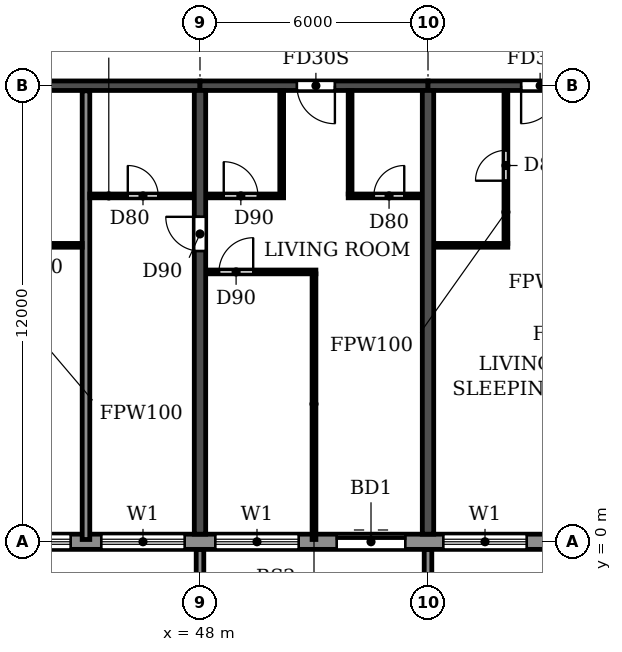
"""IFC4 building model, lengths in metres.
Left out: names, types, materials, properties, quantities, classifications, styles, units other than length and angle.
Written with IfcOpenShell. Run it as: python <this file> out.ifc"""

import sys

from ifc_helpers import new_model, si_unit, direction, frame, frame_2d, origin, place, context, subcontext, project, spatial, polyline, rectangle, outline, extrude, source, transform, mapped, element, fill, save


model = new_model("IFC4")
c1 = context("Model", 3, precision=1e-05, world=origin(), true_north=direction((0.0, 1.0)))
c2 = subcontext(c1, "Body", "Model", "MODEL_VIEW")
j1 = project(units=[si_unit("LENGTHUNIT", "METRE"), si_unit("PLANEANGLEUNIT", "RADIAN")], contexts=[c1])
p1 = place(None, origin())
s1 = spatial("IfcSite", under=j1, at=p1, CompositionType="ELEMENT")
p2 = place(p1, origin())
s2 = spatial("IfcBuilding", under=s1, at=p2, CompositionType="ELEMENT")
p3 = place(p2, frame((0.0, 0.0, 122.4)))
s3 = spatial("IfcBuildingStorey", under=s2, at=p3, CompositionType="ELEMENT", Elevation=122.4)
p4 = place(p3, frame((48.0, 0.2, 0.0), z_axis=(0.0, 0.0, 1.0), x_axis=(0.0, 1.0, 0.0)))
e1 = element("IfcWall", 1, at=p4, inside=s3, PredefinedType="SHEAR", context=c2, shape_type="SweptSolid", body=[
    extrude(rectangle(XDim=11.675, YDim=0.3, at=frame_2d((5.837, 0.0))), origin(), (0.0, 0.0, 1.0), 3.07),
])
p5 = place(p4, frame((7.45, 0.0, 0.0)))
e2 = element("IfcOpeningElement", 2, at=p5, cuts=e1, PredefinedType="OPENING", context=c2, shape_type="SweptSolid", body=[
    extrude(rectangle(XDim=0.9, YDim=2.1, at=frame_2d((0.45, 1.05))), frame((0.0, 0.16, 0.0), z_axis=(0.0, -1.0, 0.0), x_axis=(1.0, 0.0, 0.0)), (0.0, 0.0, 1.0), 0.32),
])
p6 = place(p3, frame((54.0, 0.2, 0.0), z_axis=(0.0, 0.0, 1.0), x_axis=(0.0, 1.0, 0.0)))
e3 = element("IfcWall", 3, at=p6, inside=s3, PredefinedType="SHEAR", context=c2, shape_type="SweptSolid", body=[
    extrude(rectangle(XDim=11.675, YDim=0.3, at=frame_2d((5.837, 0.0))), origin(), (0.0, 0.0, 1.0), 3.07),
])
p7 = place(p3, frame((42.0, 12.0, 0.0), z_axis=(0.0, 0.0, 1.0), x_axis=(1.0, 0.0, 0.0)))
e4 = element("IfcWall", 4, at=p7, inside=s3, PredefinedType="SHEAR", context=c2, shape_type="SweptSolid", body=[
    extrude(rectangle(XDim=6.0, YDim=0.25, at=frame_2d((3.0, 0.0))), origin(), (0.0, 0.0, 1.0), 2.47),
])
p8 = place(p3, frame((48.0, 12.0, 0.0), z_axis=(0.0, 0.0, 1.0), x_axis=(1.0, 0.0, 0.0)))
e5 = element("IfcWall", 5, at=p8, inside=s3, PredefinedType="SHEAR", context=c2, shape_type="SweptSolid", body=[
    extrude(rectangle(XDim=6.0, YDim=0.25, at=frame_2d((3.0, 0.0))), origin(), (0.0, 0.0, 1.0), 2.47),
])
p9 = place(p8, frame((2.55, 0.0, 0.0)))
e6 = element("IfcOpeningElement", 6, at=p9, cuts=e5, PredefinedType="OPENING", context=c2, shape_type="SweptSolid", body=[
    extrude(rectangle(XDim=1.0, YDim=2.1, at=frame_2d((0.5, 1.05))), frame((0.0, 0.135, 0.0), z_axis=(0.0, -1.0, 0.0), x_axis=(1.0, 0.0, 0.0)), (0.0, 0.0, 1.0), 0.27),
])
p10 = place(p3, frame((54.0, 12.0, 0.0), z_axis=(0.0, 0.0, 1.0), x_axis=(1.0, 0.0, 0.0)))
e7 = element("IfcWall", 7, at=p10, inside=s3, PredefinedType="SHEAR", context=c2, shape_type="SweptSolid", body=[
    extrude(rectangle(XDim=6.0, YDim=0.25, at=frame_2d((3.0, 0.0))), origin(), (0.0, 0.0, 1.0), 2.47),
])
p11 = place(p10, frame((2.45, 0.0, 0.0)))
e8 = element("IfcOpeningElement", 8, at=p11, cuts=e7, PredefinedType="OPENING", context=c2, shape_type="SweptSolid", body=[
    extrude(rectangle(XDim=1.0, YDim=2.1, at=frame_2d((0.5, 1.05))), frame((0.0, 0.135, 0.0), z_axis=(0.0, -1.0, 0.0), x_axis=(1.0, 0.0, 0.0)), (0.0, 0.0, 1.0), 0.27),
])
p12 = place(p3, frame((16.683, 0.0, 0.0), z_axis=(0.0, 0.0, 1.0), x_axis=(1.0, 0.0, 0.0)))
e9 = element("IfcWall", 9, at=p12, inside=s3, PredefinedType="STANDARD", context=c2, shape_type="SweptSolid", body=[
    extrude(rectangle(XDim=68.634, YDim=0.4, at=frame_2d((34.317, 0.0))), origin(), (0.0, 0.0, 1.0), 3.07),
])
p13 = place(p12, frame((1.717, 0.0, 0.9)))
e10 = element("IfcOpeningElement", 10, at=p13, cuts=e9, PredefinedType="OPENING", context=c2, shape_type="SweptSolid", body=[
    extrude(rectangle(XDim=2.2, YDim=1.5, at=frame_2d((1.1, 0.75))), frame((0.0, 0.21, 0.0), z_axis=(0.0, -1.0, 0.0), x_axis=(1.0, 0.0, 0.0)), (0.0, 0.0, 1.0), 0.42),
])
p14 = place(p12, frame((4.717, 0.0, 0.9)))
e11 = element("IfcOpeningElement", 11, at=p14, cuts=e9, PredefinedType="OPENING", context=c2, shape_type="SweptSolid", body=[
    extrude(rectangle(XDim=2.2, YDim=1.5, at=frame_2d((1.1, 0.75))), frame((0.0, 0.21, 0.0), z_axis=(0.0, -1.0, 0.0), x_axis=(1.0, 0.0, 0.0)), (0.0, 0.0, 1.0), 0.42),
])
p15 = place(p12, frame((7.717, 0.0, 0.9)))
e12 = element("IfcOpeningElement", 12, at=p15, cuts=e9, PredefinedType="OPENING", context=c2, shape_type="SweptSolid", body=[
    extrude(rectangle(XDim=2.2, YDim=1.5, at=frame_2d((1.1, 0.75))), frame((0.0, 0.21, 0.0), z_axis=(0.0, -1.0, 0.0), x_axis=(1.0, 0.0, 0.0)), (0.0, 0.0, 1.0), 0.42),
])
p16 = place(p12, frame((10.717, 0.0, 0.9)))
e13 = element("IfcOpeningElement", 13, at=p16, cuts=e9, PredefinedType="OPENING", context=c2, shape_type="SweptSolid", body=[
    extrude(rectangle(XDim=2.2, YDim=1.5, at=frame_2d((1.1, 0.75))), frame((0.0, 0.21, 0.0), z_axis=(0.0, -1.0, 0.0), x_axis=(1.0, 0.0, 0.0)), (0.0, 0.0, 1.0), 0.42),
])
p17 = place(p12, frame((13.717, 0.0, 0.9)))
e14 = element("IfcOpeningElement", 14, at=p17, cuts=e9, PredefinedType="OPENING", context=c2, shape_type="SweptSolid", body=[
    extrude(rectangle(XDim=2.2, YDim=1.5, at=frame_2d((1.1, 0.75))), frame((0.0, 0.21, 0.0), z_axis=(0.0, -1.0, 0.0), x_axis=(1.0, 0.0, 0.0)), (0.0, 0.0, 1.0), 0.42),
])
p18 = place(p12, frame((16.717, 0.0, 0.9)))
e15 = element("IfcOpeningElement", 15, at=p18, cuts=e9, PredefinedType="OPENING", context=c2, shape_type="SweptSolid", body=[
    extrude(rectangle(XDim=2.2, YDim=1.5, at=frame_2d((1.1, 0.75))), frame((0.0, 0.21, 0.0), z_axis=(0.0, -1.0, 0.0), x_axis=(1.0, 0.0, 0.0)), (0.0, 0.0, 1.0), 0.42),
])
p19 = place(p12, frame((19.717, 0.0, 0.9)))
e16 = element("IfcOpeningElement", 16, at=p19, cuts=e9, PredefinedType="OPENING", context=c2, shape_type="SweptSolid", body=[
    extrude(rectangle(XDim=2.2, YDim=1.5, at=frame_2d((1.1, 0.75))), frame((0.0, 0.21, 0.0), z_axis=(0.0, -1.0, 0.0), x_axis=(1.0, 0.0, 0.0)), (0.0, 0.0, 1.0), 0.42),
])
p20 = place(p12, frame((22.917, 0.0, 0.0)))
e17 = element("IfcOpeningElement", 17, at=p20, cuts=e9, PredefinedType="OPENING", context=c2, shape_type="SweptSolid", body=[
    extrude(rectangle(XDim=1.8, YDim=2.4, at=frame_2d((0.9, 1.2))), frame((0.0, 0.21, 0.0), z_axis=(0.0, -1.0, 0.0), x_axis=(1.0, 0.0, 0.0)), (0.0, 0.0, 1.0), 0.42),
])
p21 = place(p12, frame((25.717, 0.0, 0.9)))
e18 = element("IfcOpeningElement", 18, at=p21, cuts=e9, PredefinedType="OPENING", context=c2, shape_type="SweptSolid", body=[
    extrude(rectangle(XDim=2.2, YDim=1.5, at=frame_2d((1.1, 0.75))), frame((0.0, 0.21, 0.0), z_axis=(0.0, -1.0, 0.0), x_axis=(1.0, 0.0, 0.0)), (0.0, 0.0, 1.0), 0.42),
])
p22 = place(p12, frame((28.717, 0.0, 0.9)))
e19 = element("IfcOpeningElement", 19, at=p22, cuts=e9, PredefinedType="OPENING", context=c2, shape_type="SweptSolid", body=[
    extrude(rectangle(XDim=2.2, YDim=1.5, at=frame_2d((1.1, 0.75))), frame((0.0, 0.21, 0.0), z_axis=(0.0, -1.0, 0.0), x_axis=(1.0, 0.0, 0.0)), (0.0, 0.0, 1.0), 0.42),
])
p23 = place(p12, frame((31.717, 0.0, 0.9)))
e20 = element("IfcOpeningElement", 20, at=p23, cuts=e9, PredefinedType="OPENING", context=c2, shape_type="SweptSolid", body=[
    extrude(rectangle(XDim=2.2, YDim=1.5, at=frame_2d((1.1, 0.75))), frame((0.0, 0.21, 0.0), z_axis=(0.0, -1.0, 0.0), x_axis=(1.0, 0.0, 0.0)), (0.0, 0.0, 1.0), 0.42),
])
p24 = place(p12, frame((34.917, 0.0, 0.0)))
e21 = element("IfcOpeningElement", 21, at=p24, cuts=e9, PredefinedType="OPENING", context=c2, shape_type="SweptSolid", body=[
    extrude(rectangle(XDim=1.8, YDim=2.4, at=frame_2d((0.9, 1.2))), frame((0.0, 0.21, 0.0), z_axis=(0.0, -1.0, 0.0), x_axis=(1.0, 0.0, 0.0)), (0.0, 0.0, 1.0), 0.42),
])
p25 = place(p12, frame((37.717, 0.0, 0.9)))
e22 = element("IfcOpeningElement", 22, at=p25, cuts=e9, PredefinedType="OPENING", context=c2, shape_type="SweptSolid", body=[
    extrude(rectangle(XDim=2.2, YDim=1.5, at=frame_2d((1.1, 0.75))), frame((0.0, 0.21, 0.0), z_axis=(0.0, -1.0, 0.0), x_axis=(1.0, 0.0, 0.0)), (0.0, 0.0, 1.0), 0.42),
])
p26 = place(p12, frame((40.717, 0.0, 0.9)))
e23 = element("IfcOpeningElement", 23, at=p26, cuts=e9, PredefinedType="OPENING", context=c2, shape_type="SweptSolid", body=[
    extrude(rectangle(XDim=2.2, YDim=1.5, at=frame_2d((1.1, 0.75))), frame((0.0, 0.21, 0.0), z_axis=(0.0, -1.0, 0.0), x_axis=(1.0, 0.0, 0.0)), (0.0, 0.0, 1.0), 0.42),
])
p27 = place(p12, frame((43.717, 0.0, 0.9)))
e24 = element("IfcOpeningElement", 24, at=p27, cuts=e9, PredefinedType="OPENING", context=c2, shape_type="SweptSolid", body=[
    extrude(rectangle(XDim=2.2, YDim=1.5, at=frame_2d((1.1, 0.75))), frame((0.0, 0.21, 0.0), z_axis=(0.0, -1.0, 0.0), x_axis=(1.0, 0.0, 0.0)), (0.0, 0.0, 1.0), 0.42),
])
p28 = place(p12, frame((46.917, 0.0, 0.0)))
e25 = element("IfcOpeningElement", 25, at=p28, cuts=e9, PredefinedType="OPENING", context=c2, shape_type="SweptSolid", body=[
    extrude(rectangle(XDim=1.8, YDim=2.4, at=frame_2d((0.9, 1.2))), frame((0.0, 0.21, 0.0), z_axis=(0.0, -1.0, 0.0), x_axis=(1.0, 0.0, 0.0)), (0.0, 0.0, 1.0), 0.42),
])
p29 = place(p12, frame((49.717, 0.0, 0.9)))
e26 = element("IfcOpeningElement", 26, at=p29, cuts=e9, PredefinedType="OPENING", context=c2, shape_type="SweptSolid", body=[
    extrude(rectangle(XDim=2.2, YDim=1.5, at=frame_2d((1.1, 0.75))), frame((0.0, 0.21, 0.0), z_axis=(0.0, -1.0, 0.0), x_axis=(1.0, 0.0, 0.0)), (0.0, 0.0, 1.0), 0.42),
])
p30 = place(p12, frame((52.717, 0.0, 0.9)))
e27 = element("IfcOpeningElement", 27, at=p30, cuts=e9, PredefinedType="OPENING", context=c2, shape_type="SweptSolid", body=[
    extrude(rectangle(XDim=2.2, YDim=1.5, at=frame_2d((1.1, 0.75))), frame((0.0, 0.21, 0.0), z_axis=(0.0, -1.0, 0.0), x_axis=(1.0, 0.0, 0.0)), (0.0, 0.0, 1.0), 0.42),
])
p31 = place(p12, frame((55.717, 0.0, 0.9)))
e28 = element("IfcOpeningElement", 28, at=p31, cuts=e9, PredefinedType="OPENING", context=c2, shape_type="SweptSolid", body=[
    extrude(rectangle(XDim=2.2, YDim=1.5, at=frame_2d((1.1, 0.75))), frame((0.0, 0.21, 0.0), z_axis=(0.0, -1.0, 0.0), x_axis=(1.0, 0.0, 0.0)), (0.0, 0.0, 1.0), 0.42),
])
p32 = place(p12, frame((58.917, 0.0, 0.0)))
e29 = element("IfcOpeningElement", 29, at=p32, cuts=e9, PredefinedType="OPENING", context=c2, shape_type="SweptSolid", body=[
    extrude(rectangle(XDim=1.8, YDim=2.4, at=frame_2d((0.9, 1.2))), frame((0.0, 0.21, 0.0), z_axis=(0.0, -1.0, 0.0), x_axis=(1.0, 0.0, 0.0)), (0.0, 0.0, 1.0), 0.42),
])
p33 = place(p12, frame((61.717, 0.0, 0.9)))
e30 = element("IfcOpeningElement", 30, at=p33, cuts=e9, PredefinedType="OPENING", context=c2, shape_type="SweptSolid", body=[
    extrude(rectangle(XDim=2.2, YDim=1.5, at=frame_2d((1.1, 0.75))), frame((0.0, 0.21, 0.0), z_axis=(0.0, -1.0, 0.0), x_axis=(1.0, 0.0, 0.0)), (0.0, 0.0, 1.0), 0.42),
])
p34 = place(p12, frame((64.717, 0.0, 0.9)))
e31 = element("IfcOpeningElement", 31, at=p34, cuts=e9, PredefinedType="OPENING", context=c2, shape_type="SweptSolid", body=[
    extrude(rectangle(XDim=2.2, YDim=1.5, at=frame_2d((1.1, 0.75))), frame((0.0, 0.21, 0.0), z_axis=(0.0, -1.0, 0.0), x_axis=(1.0, 0.0, 0.0)), (0.0, 0.0, 1.0), 0.42),
])
m1 = source(origin(), c2, "Body", "SweptSolid", [
    extrude(outline(polyline([(0.0, 0.0), (0.2, 0.0), (0.2, 1.65), (0.0, 1.65), (0.0, 0.0)])), origin(), (0.0, 0.0, 1.0), 3.1),
])
for number, where in (
    (32, (47.9, -1.85, 0.0)),
    (33, (53.9, -1.85, 0.0)),
):
    element("IfcWall", number, at=place(p3, frame(where)), inside=s3, PredefinedType="STANDARD", context=c2, shape_type="MappedRepresentation", body=[
        mapped(m1, transform((0.0, 0.0, 0.0))),
    ])
p35 = place(p3, frame((45.0, 0.06, 0.0), z_axis=(0.0, 0.0, 1.0), x_axis=(0.0, 1.0, 0.0)))
e34 = element("IfcWall", 34, at=p35, inside=s3, PredefinedType="PARTITIONING", context=c2, shape_type="SweptSolid", body=[
    extrude(rectangle(XDim=11.805, YDim=0.2, at=frame_2d((5.902, 0.0))), origin(), (0.0, 0.0, 1.0), 3.07),
])
p36 = place(p3, frame((48.16, 7.1, 0.0), z_axis=(0.0, 0.0, 1.0), x_axis=(1.0, 0.0, 0.0)))
e35 = element("IfcWall", 35, at=p36, inside=s3, PredefinedType="PARTITIONING", context=c2, shape_type="SweptSolid", body=[
    extrude(rectangle(XDim=2.89, YDim=0.1, at=frame_2d((1.445, 0.0))), origin(), (0.0, 0.0, 1.0), 3.07),
])
p37 = place(p36, frame((0.34, 0.0, 0.0)))
e36 = element("IfcOpeningElement", 36, at=p37, cuts=e35, PredefinedType="OPENING", context=c2, shape_type="SweptSolid", body=[
    extrude(rectangle(XDim=0.9, YDim=2.1, at=frame_2d((0.45, 1.05))), frame((0.0, 0.06, 0.0), z_axis=(0.0, -1.0, 0.0), x_axis=(1.0, 0.0, 0.0)), (0.0, 0.0, 1.0), 0.12),
])
p38 = place(p3, frame((42.16, 7.8, 0.0), z_axis=(0.0, 0.0, 1.0), x_axis=(1.0, 0.0, 0.0)))
e37 = element("IfcWall", 37, at=p38, inside=s3, PredefinedType="PARTITIONING", context=c2, shape_type="SweptSolid", body=[
    extrude(rectangle(XDim=2.74, YDim=0.1, at=frame_2d((1.37, 0.0))), origin(), (0.0, 0.0, 1.0), 3.07),
])
p39 = place(p38, frame((0.94, 0.0, 0.0)))
e38 = element("IfcOpeningElement", 38, at=p39, cuts=e37, PredefinedType="OPENING", context=c2, shape_type="SweptSolid", body=[
    extrude(rectangle(XDim=0.8, YDim=2.1, at=frame_2d((0.4, 1.05))), frame((0.0, 0.06, 0.0), z_axis=(0.0, -1.0, 0.0), x_axis=(1.0, 0.0, 0.0)), (0.0, 0.0, 1.0), 0.12),
])
p40 = place(p3, frame((54.16, 7.8, 0.0), z_axis=(0.0, 0.0, 1.0), x_axis=(1.0, 0.0, 0.0)))
e39 = element("IfcWall", 39, at=p40, inside=s3, PredefinedType="PARTITIONING", context=c2, shape_type="SweptSolid", body=[
    extrude(rectangle(XDim=1.94, YDim=0.1, at=frame_2d((0.97, 0.0))), origin(), (0.0, 0.0, 1.0), 3.07),
])
p41 = place(p3, frame((45.1, 9.1, 0.0), z_axis=(0.0, 0.0, 1.0), x_axis=(1.0, 0.0, 0.0)))
e40 = element("IfcWall", 40, at=p41, inside=s3, PredefinedType="PARTITIONING", context=c2, shape_type="SweptSolid", body=[
    extrude(rectangle(XDim=2.74, YDim=0.1, at=frame_2d((1.37, 0.0))), origin(), (0.0, 0.0, 1.0), 3.07),
])
p42 = place(p41, frame((1.0, 0.0, 0.0)))
e41 = element("IfcOpeningElement", 41, at=p42, cuts=e40, PredefinedType="OPENING", context=c2, shape_type="SweptSolid", body=[
    extrude(rectangle(XDim=0.8, YDim=2.1, at=frame_2d((0.4, 1.05))), frame((0.0, 0.06, 0.0), z_axis=(0.0, -1.0, 0.0), x_axis=(1.0, 0.0, 0.0)), (0.0, 0.0, 1.0), 0.12),
])
p43 = place(p3, frame((48.16, 9.1, 0.0), z_axis=(0.0, 0.0, 1.0), x_axis=(1.0, 0.0, 0.0)))
e42 = element("IfcWall", 42, at=p43, inside=s3, PredefinedType="PARTITIONING", context=c2, shape_type="SweptSolid", body=[
    extrude(rectangle(XDim=2.04, YDim=0.1, at=frame_2d((1.02, 0.0))), origin(), (0.0, 0.0, 1.0), 3.07),
])
p44 = place(p43, frame((0.465, 0.0, 0.0)))
e43 = element("IfcOpeningElement", 43, at=p44, cuts=e42, PredefinedType="OPENING", context=c2, shape_type="SweptSolid", body=[
    extrude(rectangle(XDim=0.9, YDim=2.1, at=frame_2d((0.45, 1.05))), frame((0.0, 0.06, 0.0), z_axis=(0.0, -1.0, 0.0), x_axis=(1.0, 0.0, 0.0)), (0.0, 0.0, 1.0), 0.12),
])
p45 = place(p3, frame((51.9, 9.1, 0.0), z_axis=(0.0, 0.0, 1.0), x_axis=(1.0, 0.0, 0.0)))
e44 = element("IfcWall", 44, at=p45, inside=s3, PredefinedType="PARTITIONING", context=c2, shape_type="SweptSolid", body=[
    extrude(rectangle(XDim=1.94, YDim=0.1, at=frame_2d((0.97, 0.0))), origin(), (0.0, 0.0, 1.0), 3.07),
])
p46 = place(p45, frame((0.675, 0.0, 0.0)))
e45 = element("IfcOpeningElement", 45, at=p46, cuts=e44, PredefinedType="OPENING", context=c2, shape_type="SweptSolid", body=[
    extrude(rectangle(XDim=0.8, YDim=2.1, at=frame_2d((0.4, 1.05))), frame((0.0, 0.06, 0.0), z_axis=(0.0, -1.0, 0.0), x_axis=(1.0, 0.0, 0.0)), (0.0, 0.0, 1.0), 0.12),
])
p47 = place(p3, frame((50.15, 9.15, 0.0), z_axis=(0.0, 0.0, 1.0), x_axis=(0.0, 1.0, 0.0)))
e46 = element("IfcWall", 46, at=p47, inside=s3, PredefinedType="PARTITIONING", context=c2, shape_type="SweptSolid", body=[
    extrude(rectangle(XDim=2.715, YDim=0.1, at=frame_2d((1.357, 0.0))), origin(), (0.0, 0.0, 1.0), 3.07),
])
p48 = place(p3, frame((51.0, 0.06, 0.0), z_axis=(0.0, 0.0, 1.0), x_axis=(0.0, 1.0, 0.0)))
e47 = element("IfcWall", 47, at=p48, inside=s3, PredefinedType="PARTITIONING", context=c2, shape_type="SweptSolid", body=[
    extrude(rectangle(XDim=6.99, YDim=0.1, at=frame_2d((3.495, 0.0))), origin(), (0.0, 0.0, 1.0), 3.07),
])
p49 = place(p3, frame((51.95, 9.15, 0.0), z_axis=(0.0, 0.0, 1.0), x_axis=(0.0, 1.0, 0.0)))
e48 = element("IfcWall", 48, at=p49, inside=s3, PredefinedType="PARTITIONING", context=c2, shape_type="SweptSolid", body=[
    extrude(rectangle(XDim=2.715, YDim=0.1, at=frame_2d((1.357, 0.0))), origin(), (0.0, 0.0, 1.0), 3.07),
])
p50 = place(p3, frame((56.05, 7.85, 0.0), z_axis=(0.0, 0.0, 1.0), x_axis=(0.0, 1.0, 0.0)))
e49 = element("IfcWall", 49, at=p50, inside=s3, PredefinedType="PARTITIONING", context=c2, shape_type="SweptSolid", body=[
    extrude(rectangle(XDim=4.015, YDim=0.1, at=frame_2d((2.007, 0.0))), origin(), (0.0, 0.0, 1.0), 3.07),
])
p51 = place(p50, frame((1.65, 0.0, 0.0)))
e50 = element("IfcOpeningElement", 50, at=p51, cuts=e49, PredefinedType="OPENING", context=c2, shape_type="SweptSolid", body=[
    extrude(rectangle(XDim=0.8, YDim=2.1, at=frame_2d((0.4, 1.05))), frame((0.0, 0.06, 0.0), z_axis=(0.0, -1.0, 0.0), x_axis=(1.0, 0.0, 0.0)), (0.0, 0.0, 1.0), 0.12),
])
p52 = place(p21, origin())
e51 = element("IfcWindow", 51, at=p52, inside=s3, PartitioningType="DOUBLE_PANEL_HORIZONTAL", PredefinedType="WINDOW", context=c2, shape_type="SweptSolid", body=[
    extrude(rectangle(XDim=2.2, YDim=1.5, at=frame_2d((1.1, 0.75))), frame((0.0, 0.03, 0.0), z_axis=(0.0, -1.0, 0.0), x_axis=(1.0, 0.0, 0.0)), (0.0, 0.0, 1.0), 0.06),
])
fill(e18, e51)
p53 = place(p22, origin())
e52 = element("IfcWindow", 52, at=p53, inside=s3, PartitioningType="DOUBLE_PANEL_HORIZONTAL", PredefinedType="WINDOW", context=c2, shape_type="SweptSolid", body=[
    extrude(rectangle(XDim=2.2, YDim=1.5, at=frame_2d((1.1, 0.75))), frame((0.0, 0.03, 0.0), z_axis=(0.0, -1.0, 0.0), x_axis=(1.0, 0.0, 0.0)), (0.0, 0.0, 1.0), 0.06),
])
fill(e19, e52)
p54 = place(p23, origin())
e53 = element("IfcWindow", 53, at=p54, inside=s3, PartitioningType="DOUBLE_PANEL_HORIZONTAL", PredefinedType="WINDOW", context=c2, shape_type="SweptSolid", body=[
    extrude(rectangle(XDim=2.2, YDim=1.5, at=frame_2d((1.1, 0.75))), frame((0.0, 0.03, 0.0), z_axis=(0.0, -1.0, 0.0), x_axis=(1.0, 0.0, 0.0)), (0.0, 0.0, 1.0), 0.06),
])
fill(e20, e53)
p55 = place(p24, origin())
e54 = element("IfcDoor", 54, at=p55, inside=s3, OperationType="DOUBLE_DOOR_SLIDING", PredefinedType="DOOR", context=c2, shape_type="SweptSolid", body=[
    extrude(rectangle(XDim=1.8, YDim=2.4, at=frame_2d((0.9, 1.2))), frame((0.0, 0.025, 0.0), z_axis=(0.0, -1.0, 0.0), x_axis=(1.0, 0.0, 0.0)), (0.0, 0.0, 1.0), 0.05),
])
fill(e21, e54)
p56 = place(p25, origin())
e55 = element("IfcWindow", 55, at=p56, inside=s3, PartitioningType="DOUBLE_PANEL_HORIZONTAL", PredefinedType="WINDOW", context=c2, shape_type="SweptSolid", body=[
    extrude(rectangle(XDim=2.2, YDim=1.5, at=frame_2d((1.1, 0.75))), frame((0.0, 0.03, 0.0), z_axis=(0.0, -1.0, 0.0), x_axis=(1.0, 0.0, 0.0)), (0.0, 0.0, 1.0), 0.06),
])
fill(e22, e55)
p57 = place(p42, origin())
e56 = element("IfcDoor", 56, at=p57, inside=s3, OperationType="SINGLE_SWING_LEFT", PredefinedType="DOOR", context=c2, shape_type="SweptSolid", body=[
    extrude(rectangle(XDim=0.8, YDim=2.1, at=frame_2d((0.4, 1.05))), frame((0.0, 0.025, 0.0), z_axis=(0.0, -1.0, 0.0), x_axis=(1.0, 0.0, 0.0)), (0.0, 0.0, 1.0), 0.05),
])
fill(e41, e56)
p58 = place(p5, origin())
e57 = element("IfcDoor", 57, at=p58, inside=s3, OperationType="SINGLE_SWING_RIGHT", PredefinedType="DOOR", context=c2, shape_type="SweptSolid", body=[
    extrude(rectangle(XDim=0.9, YDim=2.1, at=frame_2d((0.45, 1.05))), frame((0.0, 0.025, 0.0), z_axis=(0.0, -1.0, 0.0), x_axis=(1.0, 0.0, 0.0)), (0.0, 0.0, 1.0), 0.05),
])
fill(e2, e57)
p59 = place(p37, origin())
e58 = element("IfcDoor", 58, at=p59, inside=s3, OperationType="SINGLE_SWING_RIGHT", PredefinedType="DOOR", context=c2, shape_type="SweptSolid", body=[
    extrude(rectangle(XDim=0.9, YDim=2.1, at=frame_2d((0.45, 1.05))), frame((0.0, 0.025, 0.0), z_axis=(0.0, -1.0, 0.0), x_axis=(1.0, 0.0, 0.0)), (0.0, 0.0, 1.0), 0.05),
])
fill(e36, e58)
p60 = place(p44, origin())
e59 = element("IfcDoor", 59, at=p60, inside=s3, OperationType="SINGLE_SWING_LEFT", PredefinedType="DOOR", context=c2, shape_type="SweptSolid", body=[
    extrude(rectangle(XDim=0.9, YDim=2.1, at=frame_2d((0.45, 1.05))), frame((0.0, 0.025, 0.0), z_axis=(0.0, -1.0, 0.0), x_axis=(1.0, 0.0, 0.0)), (0.0, 0.0, 1.0), 0.05),
])
fill(e43, e59)
p61 = place(p9, frame((1.0, 0.0, 0.0), z_axis=(0.0, 0.0, 1.0), x_axis=(-1.0, 0.0, 0.0)))
e60 = element("IfcDoor", 60, at=p61, inside=s3, OperationType="SINGLE_SWING_LEFT", PredefinedType="DOOR", context=c2, shape_type="SweptSolid", body=[
    extrude(rectangle(XDim=1.0, YDim=2.1, at=frame_2d((0.5, 1.05))), frame((0.0, 0.025, 0.0), z_axis=(0.0, -1.0, 0.0), x_axis=(1.0, 0.0, 0.0)), (0.0, 0.0, 1.0), 0.05),
])
fill(e6, e60)
p62 = place(p46, origin())
e61 = element("IfcDoor", 61, at=p62, inside=s3, OperationType="SINGLE_SWING_RIGHT", PredefinedType="DOOR", context=c2, shape_type="SweptSolid", body=[
    extrude(rectangle(XDim=0.8, YDim=2.1, at=frame_2d((0.4, 1.05))), frame((0.0, 0.025, 0.0), z_axis=(0.0, -1.0, 0.0), x_axis=(1.0, 0.0, 0.0)), (0.0, 0.0, 1.0), 0.05),
])
fill(e45, e61)
p63 = place(p51, origin())
e62 = element("IfcDoor", 62, at=p63, inside=s3, OperationType="SINGLE_SWING_LEFT", PredefinedType="DOOR", context=c2, shape_type="SweptSolid", body=[
    extrude(rectangle(XDim=0.8, YDim=2.1, at=frame_2d((0.4, 1.05))), frame((0.0, 0.025, 0.0), z_axis=(0.0, -1.0, 0.0), x_axis=(1.0, 0.0, 0.0)), (0.0, 0.0, 1.0), 0.05),
])
fill(e50, e62)
p64 = place(p11, frame((1.0, 0.0, 0.0), z_axis=(0.0, 0.0, 1.0), x_axis=(-1.0, 0.0, 0.0)))
e63 = element("IfcDoor", 63, at=p64, inside=s3, OperationType="SINGLE_SWING_RIGHT", PredefinedType="DOOR", context=c2, shape_type="SweptSolid", body=[
    extrude(rectangle(XDim=1.0, YDim=2.1, at=frame_2d((0.5, 1.05))), frame((0.0, 0.025, 0.0), z_axis=(0.0, -1.0, 0.0), x_axis=(1.0, 0.0, 0.0)), (0.0, 0.0, 1.0), 0.05),
])
fill(e8, e63)
save(model, sys.argv[1])
